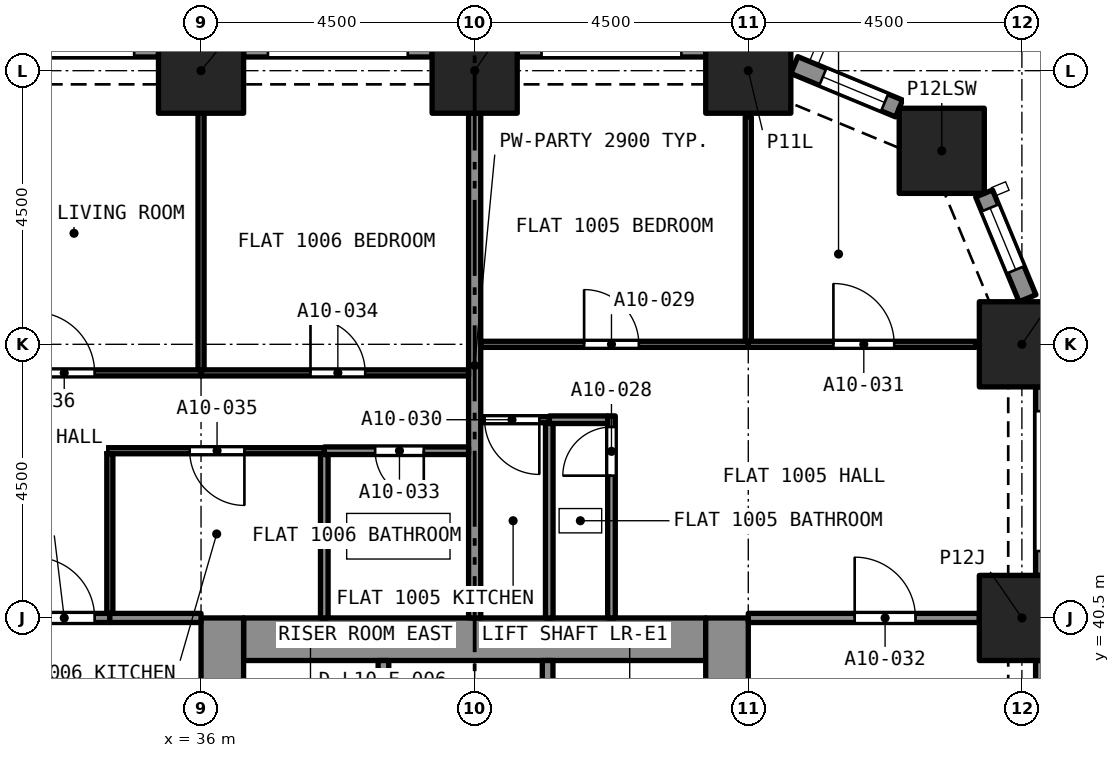
"""IFC4 building model, lengths in metres.
Left out: names, types, materials, properties, quantities, classifications, styles, units other than length and angle.
Written with IfcOpenShell. Run it as: python <this file> out.ifc"""

import sys

from ifc_helpers import new_model, si_unit, direction, frame, frame_2d, origin, origin_2d, place, context, subcontext, project, spatial, rectangle, extrude, element, fill, save


model = new_model("IFC4")
c1 = context("Model", 3, precision=1e-05, world=origin(), true_north=direction((0.0, 1.0)))
c2 = subcontext(c1, "Body", "Model", "MODEL_VIEW")
j1 = project(units=[si_unit("LENGTHUNIT", "METRE"), si_unit("PLANEANGLEUNIT", "RADIAN")], contexts=[c1])
p1 = place(None, origin())
s1 = spatial("IfcSite", under=j1, at=p1, CompositionType="ELEMENT")
p2 = place(p1, origin())
s2 = spatial("IfcBuilding", under=s1, at=p2, CompositionType="ELEMENT")
p3 = place(p2, frame((0.0, 0.0, 43.2)))
s3 = spatial("IfcBuildingStorey", under=s2, at=p3, CompositionType="ELEMENT", Elevation=43.2)
for number, where, z_axis, x_axis in (
    (1, (49.5, 40.5, 0.0), (0.0, 0.0, 1.0), (1.0, 0.0, 0.0)),
    (2, (49.5, 45.0, 0.0), (0.0, 0.0, 1.0), (1.0, 0.0, 0.0)),
    (3, (48.182, 48.182, 0.0), (0.0, 0.0, 1.0), (1.0, 0.0, 0.0)),
    (4, (36.0, 49.5, 0.0), (0.0, 0.0, 1.0), (1.0, 0.0, 0.0)),
    (5, (40.5, 49.5, 0.0), (0.0, 0.0, 1.0), (1.0, 0.0, 0.0)),
    (6, (45.0, 49.5, 0.0), (0.0, 0.0, 1.0), (1.0, 0.0, 0.0)),
):
    element("IfcColumn", number, at=place(p3, frame(where, z_axis=z_axis, x_axis=x_axis)), inside=s3, PredefinedType="COLUMN", context=c2, shape_type="SweptSolid", body=[
        extrude(rectangle(XDim=1.4, YDim=1.4, at=origin_2d()), origin(), (0.0, 0.0, 1.0), 3.2),
    ])
p4 = place(p3, frame((36.7, 40.15, 0.0), z_axis=(0.0, 0.0, 1.0), x_axis=(1.0, 0.0, 0.0)))
e7 = element("IfcWall", 7, at=p4, inside=s3, PredefinedType="SOLIDWALL", context=c2, shape_type="SweptSolid", body=[
    extrude(rectangle(XDim=7.6, YDim=0.7, at=frame_2d((3.8, 0.0))), origin(), (0.0, 0.0, 1.0), 3.2),
])
p5 = place(p3, frame((36.35, 27.0, 0.0), z_axis=(0.0, 0.0, 1.0), x_axis=(0.0, 1.0, 0.0)))
e8 = element("IfcWall", 8, at=p5, inside=s3, PredefinedType="SOLIDWALL", context=c2, shape_type="SweptSolid", body=[
    extrude(rectangle(XDim=13.5, YDim=0.7, at=frame_2d((6.75, 0.0))), origin(), (0.0, 0.0, 1.0), 3.2),
])
p6 = place(p5, frame((8.95, 0.0, 0.0)))
e9 = element("IfcOpeningElement", 9, at=p6, cuts=e8, PredefinedType="OPENING", context=c2, shape_type="SweptSolid", body=[
    extrude(rectangle(XDim=1.2, YDim=2.1, at=frame_2d((0.6, 1.05))), frame((0.0, 0.36, 0.0), z_axis=(0.0, -1.0, 0.0), x_axis=(1.0, 0.0, 0.0)), (0.0, 0.0, 1.0), 0.72),
])
p7 = place(p3, frame((44.65, 27.0, 0.0), z_axis=(0.0, 0.0, 1.0), x_axis=(0.0, 1.0, 0.0)))
e10 = element("IfcWall", 10, at=p7, inside=s3, PredefinedType="SOLIDWALL", context=c2, shape_type="SweptSolid", body=[
    extrude(rectangle(XDim=13.5, YDim=0.7, at=frame_2d((6.75, 0.0))), origin(), (0.0, 0.0, 1.0), 3.2),
])
p8 = place(p7, frame((8.95, 0.0, 0.0)))
e11 = element("IfcOpeningElement", 11, at=p8, cuts=e10, PredefinedType="OPENING", context=c2, shape_type="SweptSolid", body=[
    extrude(rectangle(XDim=1.2, YDim=2.1, at=frame_2d((0.6, 1.05))), frame((0.0, 0.36, 0.0), z_axis=(0.0, -1.0, 0.0), x_axis=(1.0, 0.0, 0.0)), (0.0, 0.0, 1.0), 0.72),
])
p9 = place(p3, frame((49.875, 39.8, 0.0), z_axis=(0.0, 0.0, 1.0), x_axis=(0.0, -1.0, 0.0)))
e12 = element("IfcWall", 12, at=p9, inside=s3, PredefinedType="SOLIDWALL", context=c2, shape_type="SweptSolid", body=[
    extrude(rectangle(XDim=3.1, YDim=0.3, at=frame_2d((1.55, 0.0))), origin(), (0.0, 0.0, 1.0), 3.2),
])
p10 = place(p9, frame((0.4, 0.0, 0.45)))
e13 = element("IfcOpeningElement", 13, at=p10, cuts=e12, PredefinedType="OPENING", context=c2, shape_type="SweptSolid", body=[
    extrude(rectangle(XDim=2.3, YDim=1.95, at=frame_2d((1.15, 0.975))), frame((0.0, 0.16, 0.0), z_axis=(0.0, -1.0, 0.0), x_axis=(1.0, 0.0, 0.0)), (0.0, 0.0, 1.0), 0.32),
])
p11 = place(p3, frame((49.875, 44.3, 0.0), z_axis=(0.0, 0.0, 1.0), x_axis=(0.0, -1.0, 0.0)))
e14 = element("IfcWall", 14, at=p11, inside=s3, PredefinedType="SOLIDWALL", context=c2, shape_type="SweptSolid", body=[
    extrude(rectangle(XDim=3.1, YDim=0.3, at=frame_2d((1.55, 0.0))), origin(), (0.0, 0.0, 1.0), 3.2),
])
p12 = place(p11, frame((0.4, 0.0, 0.45)))
e15 = element("IfcOpeningElement", 15, at=p12, cuts=e14, PredefinedType="OPENING", context=c2, shape_type="SweptSolid", body=[
    extrude(rectangle(XDim=2.3, YDim=1.95, at=frame_2d((1.15, 0.975))), frame((0.0, 0.16, 0.0), z_axis=(0.0, -1.0, 0.0), x_axis=(1.0, 0.0, 0.0)), (0.0, 0.0, 1.0), 0.32),
])
p13 = place(p3, frame((48.878, 47.48, 0.0), z_axis=(0.0, 0.0, 1.0), x_axis=(0.38262540684, -0.923903565336, 0.0)))
e16 = element("IfcWall", 16, at=p13, inside=s3, PredefinedType="SOLIDWALL", context=c2, shape_type="SweptSolid", body=[
    extrude(rectangle(XDim=1.865, YDim=0.3, at=frame_2d((0.933, 0.0))), origin(), (0.0, 0.0, 1.0), 3.2),
])
p14 = place(p13, frame((0.258, 0.0, 0.45)))
e17 = element("IfcOpeningElement", 17, at=p14, cuts=e16, PredefinedType="OPENING", context=c2, shape_type="SweptSolid", body=[
    extrude(rectangle(XDim=1.1, YDim=1.95, at=frame_2d((0.55, 0.975))), frame((0.0, 0.16, 0.0), z_axis=(0.0, -1.0, 0.0), x_axis=(1.0, 0.0, 0.0)), (0.0, 0.0, 1.0), 0.32),
])
p15 = place(p3, frame((45.757, 49.592, 0.0), z_axis=(0.0, 0.0, 1.0), x_axis=(0.923857286003, -0.382737135771, 0.0)))
e18 = element("IfcWall", 18, at=p15, inside=s3, PredefinedType="SOLIDWALL", context=c2, shape_type="SweptSolid", body=[
    extrude(rectangle(XDim=1.865, YDim=0.3, at=frame_2d((0.933, 0.0))), origin(), (0.0, 0.0, 1.0), 3.2),
])
p16 = place(p15, frame((0.508, 0.0, 0.45)))
e19 = element("IfcOpeningElement", 19, at=p16, cuts=e18, PredefinedType="OPENING", context=c2, shape_type="SweptSolid", body=[
    extrude(rectangle(XDim=1.1, YDim=1.95, at=frame_2d((0.55, 0.975))), frame((0.0, 0.16, 0.0), z_axis=(0.0, -1.0, 0.0), x_axis=(1.0, 0.0, 0.0)), (0.0, 0.0, 1.0), 0.32),
])
p17 = place(p3, frame((41.2, 49.875, 0.0), z_axis=(0.0, 0.0, 1.0), x_axis=(1.0, 0.0, 0.0)))
e20 = element("IfcWall", 20, at=p17, inside=s3, PredefinedType="SOLIDWALL", context=c2, shape_type="SweptSolid", body=[
    extrude(rectangle(XDim=3.1, YDim=0.3, at=frame_2d((1.55, 0.0))), origin(), (0.0, 0.0, 1.0), 3.2),
])
p18 = place(p17, frame((0.4, 0.0, 0.45)))
e21 = element("IfcOpeningElement", 21, at=p18, cuts=e20, PredefinedType="OPENING", context=c2, shape_type="SweptSolid", body=[
    extrude(rectangle(XDim=2.3, YDim=1.95, at=frame_2d((1.15, 0.975))), frame((0.0, 0.16, 0.0), z_axis=(0.0, -1.0, 0.0), x_axis=(1.0, 0.0, 0.0)), (0.0, 0.0, 1.0), 0.32),
])
p19 = place(p3, frame((36.7, 49.875, 0.0), z_axis=(0.0, 0.0, 1.0), x_axis=(1.0, 0.0, 0.0)))
e22 = element("IfcWall", 22, at=p19, inside=s3, PredefinedType="SOLIDWALL", context=c2, shape_type="SweptSolid", body=[
    extrude(rectangle(XDim=3.1, YDim=0.3, at=frame_2d((1.55, 0.0))), origin(), (0.0, 0.0, 1.0), 3.2),
])
p20 = place(p19, frame((0.4, 0.0, 0.45)))
e23 = element("IfcOpeningElement", 23, at=p20, cuts=e22, PredefinedType="OPENING", context=c2, shape_type="SweptSolid", body=[
    extrude(rectangle(XDim=2.3, YDim=1.95, at=frame_2d((1.15, 0.975))), frame((0.0, 0.16, 0.0), z_axis=(0.0, -1.0, 0.0), x_axis=(1.0, 0.0, 0.0)), (0.0, 0.0, 1.0), 0.32),
])
p21 = place(p3, frame((32.2, 49.875, 0.0), z_axis=(0.0, 0.0, 1.0), x_axis=(1.0, 0.0, 0.0)))
e24 = element("IfcWall", 24, at=p21, inside=s3, PredefinedType="SOLIDWALL", context=c2, shape_type="SweptSolid", body=[
    extrude(rectangle(XDim=3.1, YDim=0.3, at=frame_2d((1.55, 0.0))), origin(), (0.0, 0.0, 1.0), 3.2),
])
p22 = place(p21, frame((0.4, 0.0, 0.45)))
e25 = element("IfcOpeningElement", 25, at=p22, cuts=e24, PredefinedType="OPENING", context=c2, shape_type="SweptSolid", body=[
    extrude(rectangle(XDim=2.3, YDim=1.95, at=frame_2d((1.15, 0.975))), frame((0.0, 0.16, 0.0), z_axis=(0.0, -1.0, 0.0), x_axis=(1.0, 0.0, 0.0)), (0.0, 0.0, 1.0), 0.32),
])
p23 = place(p3, frame((41.727, 43.76, 0.0), z_axis=(0.0, 0.0, 1.0), x_axis=(1.0, 0.0, 0.0)))
e26 = element("IfcWall", 26, at=p23, inside=s3, PredefinedType="PARTITIONING", context=c2, shape_type="SweptSolid", body=[
    extrude(rectangle(XDim=0.96, YDim=0.125, at=frame_2d((0.48, 0.0))), origin(), (0.0, 0.0, 1.0), 2.9),
])
p24 = place(p3, frame((42.75, 40.5, 0.0), z_axis=(0.0, 0.0, 1.0), x_axis=(0.0, 1.0, 0.0)))
e27 = element("IfcWall", 27, at=p24, inside=s3, PredefinedType="PARTITIONING", context=c2, shape_type="SweptSolid", body=[
    extrude(rectangle(XDim=3.323, YDim=0.125, at=frame_2d((1.661, 0.0))), origin(), (0.0, 0.0, 1.0), 2.9),
])
p25 = place(p24, frame((2.34, 0.0, 0.0)))
e28 = element("IfcOpeningElement", 28, at=p25, cuts=e27, PredefinedType="OPENING", context=c2, shape_type="SweptSolid", body=[
    extrude(rectangle(XDim=0.8, YDim=2.1, at=frame_2d((0.4, 1.05))), frame((0.0, 0.073, 0.0), z_axis=(0.0, -1.0, 0.0), x_axis=(1.0, 0.0, 0.0)), (0.0, 0.0, 1.0), 0.145),
])
p26 = place(p3, frame((41.727, 40.5, 0.0), z_axis=(0.0, 0.0, 1.0), x_axis=(0.0, 1.0, 0.0)))
e29 = element("IfcWall", 29, at=p26, inside=s3, PredefinedType="PARTITIONING", context=c2, shape_type="SweptSolid", body=[
    extrude(rectangle(XDim=3.198, YDim=0.125, at=frame_2d((1.599, 0.0))), origin(), (0.0, 0.0, 1.0), 2.9),
])
p27 = place(p3, frame((40.6, 45.0, 0.0), z_axis=(0.0, 0.0, 1.0), x_axis=(1.0, 0.0, 0.0)))
e30 = element("IfcWall", 30, at=p27, inside=s3, PredefinedType="PARTITIONING", context=c2, shape_type="SweptSolid", body=[
    extrude(rectangle(XDim=4.4, YDim=0.1, at=frame_2d((2.2, 0.0))), origin(), (0.0, 0.0, 1.0), 2.9),
])
p28 = place(p27, frame((1.7, 0.0, 0.0)))
e31 = element("IfcOpeningElement", 31, at=p28, cuts=e30, PredefinedType="OPENING", context=c2, shape_type="SweptSolid", body=[
    extrude(rectangle(XDim=0.9, YDim=2.1, at=frame_2d((0.45, 1.05))), frame((0.0, 0.06, 0.0), z_axis=(0.0, -1.0, 0.0), x_axis=(1.0, 0.0, 0.0)), (0.0, 0.0, 1.0), 0.12),
])
p29 = place(p3, frame((45.0, 45.05, 0.0), z_axis=(0.0, 0.0, 1.0), x_axis=(0.0, 1.0, 0.0)))
e32 = element("IfcWall", 32, at=p29, inside=s3, PredefinedType="PARTITIONING", context=c2, shape_type="SweptSolid", body=[
    extrude(rectangle(XDim=3.692, YDim=0.1, at=frame_2d((1.846, 0.0))), origin(), (0.0, 0.0, 1.0), 2.9),
])
p30 = place(p3, frame((41.727, 43.76, 0.0), z_axis=(0.0, 0.0, 1.0), x_axis=(-1.0, 0.0, 0.0)))
e33 = element("IfcWall", 33, at=p30, inside=s3, PredefinedType="PARTITIONING", context=c2, shape_type="SweptSolid", body=[
    extrude(rectangle(XDim=1.127, YDim=0.1, at=frame_2d((0.563, 0.0))), origin(), (0.0, 0.0, 1.0), 2.9),
])
p31 = place(p30, frame((0.164, 0.0, 0.0)))
e34 = element("IfcOpeningElement", 34, at=p31, cuts=e33, PredefinedType="OPENING", context=c2, shape_type="SweptSolid", body=[
    extrude(rectangle(XDim=0.9, YDim=2.1, at=frame_2d((0.45, 1.05))), frame((0.0, 0.06, 0.0), z_axis=(0.0, -1.0, 0.0), x_axis=(1.0, 0.0, 0.0)), (0.0, 0.0, 1.0), 0.12),
])
p32 = place(p3, frame((45.0, 45.0, 0.0), z_axis=(0.0, 0.0, 1.0), x_axis=(1.0, 0.0, 0.0)))
e35 = element("IfcWall", 35, at=p32, inside=s3, PredefinedType="PARTITIONING", context=c2, shape_type="SweptSolid", body=[
    extrude(rectangle(XDim=3.742, YDim=0.1, at=frame_2d((1.871, 0.0))), origin(), (0.0, 0.0, 1.0), 2.9),
])
p33 = place(p32, frame((1.4, 0.0, 0.0)))
e36 = element("IfcOpeningElement", 36, at=p33, cuts=e35, PredefinedType="OPENING", context=c2, shape_type="SweptSolid", body=[
    extrude(rectangle(XDim=1.0, YDim=2.1, at=frame_2d((0.5, 1.05))), frame((0.0, 0.06, 0.0), z_axis=(0.0, -1.0, 0.0), x_axis=(1.0, 0.0, 0.0)), (0.0, 0.0, 1.0), 0.12),
])
p34 = place(p3, frame((45.0, 40.5, 0.0), z_axis=(0.0, 0.0, 1.0), x_axis=(1.0, 0.0, 0.0)))
e37 = element("IfcWall", 37, at=p34, inside=s3, PredefinedType="PARTITIONING", context=c2, shape_type="SweptSolid", body=[
    extrude(rectangle(XDim=3.8, YDim=0.15, at=frame_2d((1.9, 0.0))), origin(), (0.0, 0.0, 1.0), 2.9),
])
p35 = place(p34, frame((1.75, 0.0, 0.0)))
e38 = element("IfcOpeningElement", 38, at=p35, cuts=e37, PredefinedType="OPENING", context=c2, shape_type="SweptSolid", body=[
    extrude(rectangle(XDim=1.0, YDim=2.1, at=frame_2d((0.5, 1.05))), frame((0.0, 0.085, 0.0), z_axis=(0.0, -1.0, 0.0), x_axis=(1.0, 0.0, 0.0)), (0.0, 0.0, 1.0), 0.17),
])
p36 = place(p3, frame((40.5, 40.5, 0.0), z_axis=(0.0, 0.0, 1.0), x_axis=(0.0, 1.0, 0.0)))
e39 = element("IfcWall", 39, at=p36, inside=s3, PredefinedType="PARTITIONING", context=c2, shape_type="SweptSolid", body=[
    extrude(rectangle(XDim=8.3, YDim=0.2, at=frame_2d((4.15, 0.0))), origin(), (0.0, 0.0, 1.0), 2.9),
])
p37 = place(p3, frame((40.4, 43.25, 0.0), z_axis=(0.0, 0.0, 1.0), x_axis=(-1.0, 0.0, 0.0)))
e40 = element("IfcWall", 40, at=p37, inside=s3, PredefinedType="PARTITIONING", context=c2, shape_type="SweptSolid", body=[
    extrude(rectangle(XDim=2.373, YDim=0.125, at=frame_2d((1.187, 0.0))), origin(), (0.0, 0.0, 1.0), 2.9),
])
p38 = place(p37, frame((0.737, 0.0, 0.0)))
e41 = element("IfcOpeningElement", 41, at=p38, cuts=e40, PredefinedType="OPENING", context=c2, shape_type="SweptSolid", body=[
    extrude(rectangle(XDim=0.8, YDim=2.1, at=frame_2d((0.4, 1.05))), frame((0.0, 0.073, 0.0), z_axis=(0.0, -1.0, 0.0), x_axis=(1.0, 0.0, 0.0)), (0.0, 0.0, 1.0), 0.145),
])
p39 = place(p3, frame((38.027, 40.5, 0.0), z_axis=(0.0, 0.0, 1.0), x_axis=(0.0, 1.0, 0.0)))
e42 = element("IfcWall", 42, at=p39, inside=s3, PredefinedType="PARTITIONING", context=c2, shape_type="SweptSolid", body=[
    extrude(rectangle(XDim=2.688, YDim=0.125, at=frame_2d((1.344, 0.0))), origin(), (0.0, 0.0, 1.0), 2.9),
])
p40 = place(p3, frame((36.0, 44.53, 0.0), z_axis=(0.0, 0.0, 1.0), x_axis=(1.0, 0.0, 0.0)))
e43 = element("IfcWall", 43, at=p40, inside=s3, PredefinedType="PARTITIONING", context=c2, shape_type="SweptSolid", body=[
    extrude(rectangle(XDim=4.4, YDim=0.1, at=frame_2d((2.2, 0.0))), origin(), (0.0, 0.0, 1.0), 2.9),
])
p41 = place(p40, frame((1.8, 0.0, 0.0)))
e44 = element("IfcOpeningElement", 44, at=p41, cuts=e43, PredefinedType="OPENING", context=c2, shape_type="SweptSolid", body=[
    extrude(rectangle(XDim=0.9, YDim=2.1, at=frame_2d((0.45, 1.05))), frame((0.0, 0.06, 0.0), z_axis=(0.0, -1.0, 0.0), x_axis=(1.0, 0.0, 0.0)), (0.0, 0.0, 1.0), 0.12),
])
p42 = place(p3, frame((36.0, 44.58, 0.0), z_axis=(0.0, 0.0, 1.0), x_axis=(0.0, 1.0, 0.0)))
e45 = element("IfcWall", 45, at=p42, inside=s3, PredefinedType="PARTITIONING", context=c2, shape_type="SweptSolid", body=[
    extrude(rectangle(XDim=4.22, YDim=0.1, at=frame_2d((2.11, 0.0))), origin(), (0.0, 0.0, 1.0), 2.9),
])
p43 = place(p3, frame((38.027, 43.25, 0.0), z_axis=(0.0, 0.0, 1.0), x_axis=(-1.0, 0.0, 0.0)))
e46 = element("IfcWall", 46, at=p43, inside=s3, PredefinedType="PARTITIONING", context=c2, shape_type="SweptSolid", body=[
    extrude(rectangle(XDim=3.577, YDim=0.1, at=frame_2d((1.788, 0.0))), origin(), (0.0, 0.0, 1.0), 2.9),
])
p44 = place(p43, frame((1.313, 0.0, 0.0)))
e47 = element("IfcOpeningElement", 47, at=p44, cuts=e46, PredefinedType="OPENING", context=c2, shape_type="SweptSolid", body=[
    extrude(rectangle(XDim=0.9, YDim=2.1, at=frame_2d((0.45, 1.05))), frame((0.0, 0.06, 0.0), z_axis=(0.0, -1.0, 0.0), x_axis=(1.0, 0.0, 0.0)), (0.0, 0.0, 1.0), 0.12),
])
p45 = place(p3, frame((34.5, 40.575, 0.0), z_axis=(0.0, 0.0, 1.0), x_axis=(0.0, 1.0, 0.0)))
e48 = element("IfcWall", 48, at=p45, inside=s3, PredefinedType="PARTITIONING", context=c2, shape_type="SweptSolid", body=[
    extrude(rectangle(XDim=2.625, YDim=0.1, at=frame_2d((1.312, 0.0))), origin(), (0.0, 0.0, 1.0), 2.9),
])
p46 = place(p3, frame((32.2, 44.53, 0.0), z_axis=(0.0, 0.0, 1.0), x_axis=(1.0, 0.0, 0.0)))
e49 = element("IfcWall", 49, at=p46, inside=s3, PredefinedType="PARTITIONING", context=c2, shape_type="SweptSolid", body=[
    extrude(rectangle(XDim=3.8, YDim=0.1, at=frame_2d((1.9, 0.0))), origin(), (0.0, 0.0, 1.0), 2.9),
])
p47 = place(p46, frame((1.05, 0.0, 0.0)))
e50 = element("IfcOpeningElement", 50, at=p47, cuts=e49, PredefinedType="OPENING", context=c2, shape_type="SweptSolid", body=[
    extrude(rectangle(XDim=1.0, YDim=2.1, at=frame_2d((0.5, 1.05))), frame((0.0, 0.06, 0.0), z_axis=(0.0, -1.0, 0.0), x_axis=(1.0, 0.0, 0.0)), (0.0, 0.0, 1.0), 0.12),
])
p48 = place(p3, frame((32.2, 40.5, 0.0), z_axis=(0.0, 0.0, 1.0), x_axis=(1.0, 0.0, 0.0)))
e51 = element("IfcWall", 51, at=p48, inside=s3, PredefinedType="PARTITIONING", context=c2, shape_type="SweptSolid", body=[
    extrude(rectangle(XDim=2.3, YDim=0.15, at=frame_2d((1.15, 0.0))), origin(), (0.0, 0.0, 1.0), 2.9),
])
p49 = place(p48, frame((1.05, 0.0, 0.0)))
e52 = element("IfcOpeningElement", 52, at=p49, cuts=e51, PredefinedType="OPENING", context=c2, shape_type="SweptSolid", body=[
    extrude(rectangle(XDim=1.0, YDim=2.1, at=frame_2d((0.5, 1.05))), frame((0.0, 0.085, 0.0), z_axis=(0.0, -1.0, 0.0), x_axis=(1.0, 0.0, 0.0)), (0.0, 0.0, 1.0), 0.17),
])
p50 = place(p3, frame((34.5, 40.5, 0.0), z_axis=(0.0, 0.0, 1.0), x_axis=(1.0, 0.0, 0.0)))
e53 = element("IfcWall", 53, at=p50, inside=s3, PredefinedType="PARTITIONING", context=c2, shape_type="SweptSolid", body=[
    extrude(rectangle(XDim=1.5, YDim=0.15, at=frame_2d((0.75, 0.0))), origin(), (0.0, 0.0, 1.0), 2.9),
])
for number, where, z_axis, x_axis in (
    (54, (41.7, 37.5, 0.0), (0.0, 0.0, 1.0), (0.0, 1.0, 0.0)),
    (55, (39.0, 37.5, 0.0), (0.0, 0.0, 1.0), (0.0, 1.0, 0.0)),
):
    element("IfcWall", number, at=place(p3, frame(where, z_axis=z_axis, x_axis=x_axis)), inside=s3, PredefinedType="SOLIDWALL", context=c2, shape_type="SweptSolid", body=[
        extrude(rectangle(XDim=2.3, YDim=0.175, at=frame_2d((1.15, 0.0))), origin(), (0.0, 0.0, 1.0), 2.9),
    ])
p51 = place(p14, origin())
e56 = element("IfcWindow", 56, at=p51, inside=s3, PartitioningType="SINGLE_PANEL", PredefinedType="WINDOW", context=c2, shape_type="SweptSolid", body=[
    extrude(rectangle(XDim=1.1, YDim=1.95, at=frame_2d((0.55, 0.975))), frame((0.0, 0.03, 0.0), z_axis=(0.0, -1.0, 0.0), x_axis=(1.0, 0.0, 0.0)), (0.0, 0.0, 1.0), 0.06),
])
fill(e17, e56)
p52 = place(p16, origin())
e57 = element("IfcWindow", 57, at=p52, inside=s3, PartitioningType="SINGLE_PANEL", PredefinedType="WINDOW", context=c2, shape_type="SweptSolid", body=[
    extrude(rectangle(XDim=1.1, YDim=1.95, at=frame_2d((0.55, 0.975))), frame((0.0, 0.03, 0.0), z_axis=(0.0, -1.0, 0.0), x_axis=(1.0, 0.0, 0.0)), (0.0, 0.0, 1.0), 0.06),
])
fill(e19, e57)
p53 = place(p25, origin())
e58 = element("IfcDoor", 58, at=p53, inside=s3, OperationType="SINGLE_SWING_RIGHT", PredefinedType="DOOR", context=c2, shape_type="SweptSolid", body=[
    extrude(rectangle(XDim=0.8, YDim=2.1, at=frame_2d((0.4, 1.05))), frame((0.0, 0.025, 0.0), z_axis=(0.0, -1.0, 0.0), x_axis=(1.0, 0.0, 0.0)), (0.0, 0.0, 1.0), 0.05),
])
fill(e28, e58)
p54 = place(p28, origin())
e59 = element("IfcDoor", 59, at=p54, inside=s3, OperationType="SINGLE_SWING_LEFT", PredefinedType="DOOR", context=c2, shape_type="SweptSolid", body=[
    extrude(rectangle(XDim=0.9, YDim=2.1, at=frame_2d((0.45, 1.05))), frame((0.0, 0.025, 0.0), z_axis=(0.0, -1.0, 0.0), x_axis=(1.0, 0.0, 0.0)), (0.0, 0.0, 1.0), 0.05),
])
fill(e31, e59)
p55 = place(p31, origin())
e60 = element("IfcDoor", 60, at=p55, inside=s3, OperationType="SINGLE_SWING_RIGHT", PredefinedType="DOOR", context=c2, shape_type="SweptSolid", body=[
    extrude(rectangle(XDim=0.9, YDim=2.1, at=frame_2d((0.45, 1.05))), frame((0.0, 0.025, 0.0), z_axis=(0.0, -1.0, 0.0), x_axis=(1.0, 0.0, 0.0)), (0.0, 0.0, 1.0), 0.05),
])
fill(e34, e60)
p56 = place(p33, origin())
e61 = element("IfcDoor", 61, at=p56, inside=s3, OperationType="SINGLE_SWING_RIGHT", PredefinedType="DOOR", context=c2, shape_type="SweptSolid", body=[
    extrude(rectangle(XDim=1.0, YDim=2.1, at=frame_2d((0.5, 1.05))), frame((0.0, 0.025, 0.0), z_axis=(0.0, -1.0, 0.0), x_axis=(1.0, 0.0, 0.0)), (0.0, 0.0, 1.0), 0.05),
])
fill(e36, e61)
p57 = place(p35, origin())
e62 = element("IfcDoor", 62, at=p57, inside=s3, OperationType="SINGLE_SWING_RIGHT", PredefinedType="DOOR", context=c2, shape_type="SweptSolid", body=[
    extrude(rectangle(XDim=1.0, YDim=2.1, at=frame_2d((0.5, 1.05))), frame((0.0, 0.025, 0.0), z_axis=(0.0, -1.0, 0.0), x_axis=(1.0, 0.0, 0.0)), (0.0, 0.0, 1.0), 0.05),
])
fill(e38, e62)
p58 = place(p38, origin())
e63 = element("IfcDoor", 63, at=p58, inside=s3, OperationType="SINGLE_SWING_LEFT", PredefinedType="DOOR", context=c2, shape_type="SweptSolid", body=[
    extrude(rectangle(XDim=0.8, YDim=2.1, at=frame_2d((0.4, 1.05))), frame((0.0, 0.025, 0.0), z_axis=(0.0, -1.0, 0.0), x_axis=(1.0, 0.0, 0.0)), (0.0, 0.0, 1.0), 0.05),
])
fill(e41, e63)
p59 = place(p41, origin())
e64 = element("IfcDoor", 64, at=p59, inside=s3, OperationType="SINGLE_SWING_RIGHT", PredefinedType="DOOR", context=c2, shape_type="SweptSolid", body=[
    extrude(rectangle(XDim=0.9, YDim=2.1, at=frame_2d((0.45, 1.05))), frame((0.0, 0.025, 0.0), z_axis=(0.0, -1.0, 0.0), x_axis=(1.0, 0.0, 0.0)), (0.0, 0.0, 1.0), 0.05),
])
fill(e44, e64)
p60 = place(p44, origin())
e65 = element("IfcDoor", 65, at=p60, inside=s3, OperationType="SINGLE_SWING_LEFT", PredefinedType="DOOR", context=c2, shape_type="SweptSolid", body=[
    extrude(rectangle(XDim=0.9, YDim=2.1, at=frame_2d((0.45, 1.05))), frame((0.0, 0.025, 0.0), z_axis=(0.0, -1.0, 0.0), x_axis=(1.0, 0.0, 0.0)), (0.0, 0.0, 1.0), 0.05),
])
fill(e47, e65)
p61 = place(p47, origin())
e66 = element("IfcDoor", 66, at=p61, inside=s3, OperationType="SINGLE_SWING_LEFT", PredefinedType="DOOR", context=c2, shape_type="SweptSolid", body=[
    extrude(rectangle(XDim=1.0, YDim=2.1, at=frame_2d((0.5, 1.05))), frame((0.0, 0.025, 0.0), z_axis=(0.0, -1.0, 0.0), x_axis=(1.0, 0.0, 0.0)), (0.0, 0.0, 1.0), 0.05),
])
fill(e50, e66)
p62 = place(p49, origin())
e67 = element("IfcDoor", 67, at=p62, inside=s3, OperationType="SINGLE_SWING_RIGHT", PredefinedType="DOOR", context=c2, shape_type="SweptSolid", body=[
    extrude(rectangle(XDim=1.0, YDim=2.1, at=frame_2d((0.5, 1.05))), frame((0.0, 0.025, 0.0), z_axis=(0.0, -1.0, 0.0), x_axis=(1.0, 0.0, 0.0)), (0.0, 0.0, 1.0), 0.05),
])
fill(e52, e67)
save(model, sys.argv[1])
